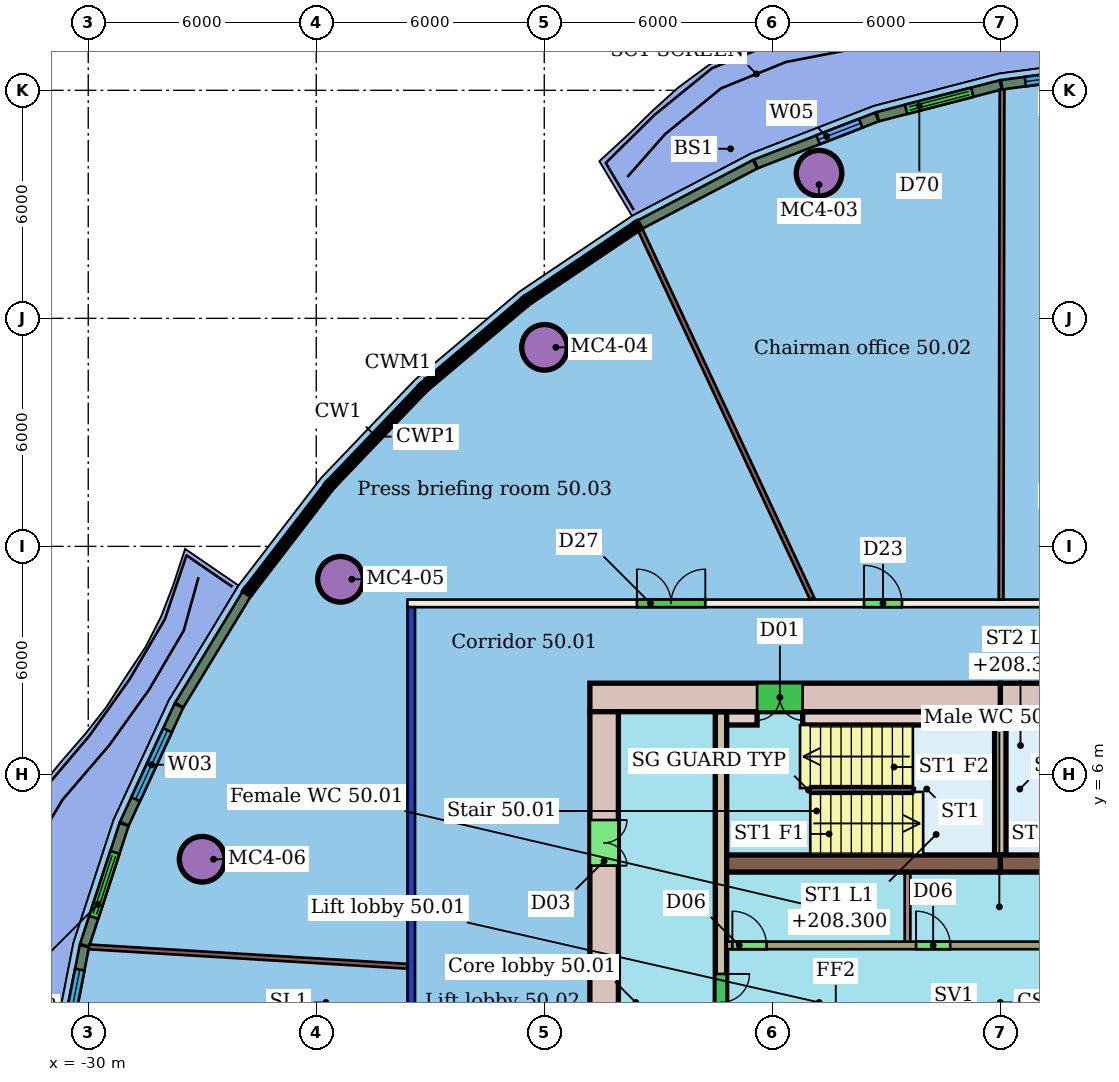
"""IFC4 building model, lengths in metres.
Left out: names, types, materials, properties, quantities, classifications, styles, units other than length and angle.
Written with IfcOpenShell. Run it as: python <this file> out.ifc"""

import sys

from ifc_helpers import new_model, si_unit, direction, frame, frame_2d, origin, origin_2d, place, context, subcontext, project, spatial, rectangle, hollow_circle, extrude, element, fill, save


model = new_model("IFC4")
c1 = context("Model", 3, precision=1e-05, world=origin(), true_north=direction((0.0, 1.0)))
c2 = subcontext(c1, "Body", "Model", "MODEL_VIEW")
j1 = project(units=[si_unit("LENGTHUNIT", "METRE"), si_unit("PLANEANGLEUNIT", "RADIAN")], contexts=[c1])
p1 = place(None, origin())
s1 = spatial("IfcSite", under=j1, at=p1, CompositionType="ELEMENT")
p2 = place(p1, origin())
s2 = spatial("IfcBuilding", under=s1, at=p2, CompositionType="ELEMENT")
p3 = place(p2, frame((0.0, 0.0, 206.5)))
s3 = spatial("IfcBuildingStorey", under=s2, at=p3, CompositionType="ELEMENT", Elevation=206.5)
for number, where, z_axis, x_axis in (
    (1, (-10.769, 21.819, 0.0), (0.0, 0.0, 1.0), (1.0, 0.0, 0.0)),
    (2, (-17.993, 17.237, 0.0), (0.0, 0.0, 1.0), (1.0, 0.0, 0.0)),
    (3, (-23.363, 11.134, 0.0), (0.0, 0.0, 1.0), (1.0, 0.0, 0.0)),
    (4, (-27.003, 3.768, 0.0), (0.0, 0.0, 1.0), (1.0, 0.0, 0.0)),
):
    element("IfcColumn", number, at=place(p3, frame(where, z_axis=z_axis, x_axis=x_axis)), inside=s3, PredefinedType="COLUMN", context=c2, shape_type="SweptSolid", body=[
        extrude(hollow_circle(Radius=0.6, WallThickness=0.045, at=origin_2d()), origin(), (0.0, 0.0, 1.0), 3.45),
    ])
p4 = place(p3, frame((-21.5, -10.4, 0.0), z_axis=(0.0, 0.0, 1.0), x_axis=(0.0, 1.0, 0.0)))
e5 = element("IfcWall", 5, at=p4, inside=s3, PredefinedType="PARTITIONING", context=c2, shape_type="SweptSolid", body=[
    extrude(rectangle(XDim=20.8, YDim=0.2, at=frame_2d((10.4, 0.0))), origin(), (0.0, 0.0, 1.0), 3.05),
])
p5 = place(p4, frame((6.461, 0.0, 0.0)))
e6 = element("IfcOpeningElement", 6, at=p5, cuts=e5, PredefinedType="OPENING", context=c2, shape_type="SweptSolid", body=[
    extrude(rectangle(XDim=1.8, YDim=2.1, at=frame_2d((0.9, 1.05))), frame((0.0, 0.11, 0.0), z_axis=(0.0, -1.0, 0.0), x_axis=(1.0, 0.0, 0.0)), (0.0, 0.0, 1.0), 0.22),
])
p6 = place(p3, frame((-21.6, 10.5, 0.0), z_axis=(0.0, 0.0, 1.0), x_axis=(1.0, 0.0, 0.0)))
e7 = element("IfcWall", 7, at=p6, inside=s3, PredefinedType="PARTITIONING", context=c2, shape_type="SweptSolid", body=[
    extrude(rectangle(XDim=31.2, YDim=0.2, at=frame_2d((15.6, 0.0))), origin(), (0.0, 0.0, 1.0), 3.45),
])
p7 = place(p6, frame((18.717, 0.0, 0.0)))
e8 = element("IfcOpeningElement", 8, at=p7, cuts=e7, PredefinedType="OPENING", context=c2, shape_type="SweptSolid", body=[
    extrude(rectangle(XDim=1.0, YDim=2.4, at=frame_2d((0.5, 1.2))), frame((0.0, 0.11, 0.0), z_axis=(0.0, -1.0, 0.0), x_axis=(1.0, 0.0, 0.0)), (0.0, 0.0, 1.0), 0.22),
])
p8 = place(p6, frame((12.014, 0.0, 0.0)))
e9 = element("IfcOpeningElement", 9, at=p8, cuts=e7, PredefinedType="OPENING", context=c2, shape_type="SweptSolid", body=[
    extrude(rectangle(XDim=1.0, YDim=2.4, at=frame_2d((0.5, 1.2))), frame((0.0, 0.11, 0.0), z_axis=(0.0, -1.0, 0.0), x_axis=(1.0, 0.0, 0.0)), (0.0, 0.0, 1.0), 0.22),
])
p9 = place(p6, frame((6.037, 0.0, 0.0)))
e10 = element("IfcOpeningElement", 10, at=p9, cuts=e7, PredefinedType="OPENING", context=c2, shape_type="SweptSolid", body=[
    extrude(rectangle(XDim=1.8, YDim=2.4, at=frame_2d((0.9, 1.2))), frame((0.0, 0.11, 0.0), z_axis=(0.0, -1.0, 0.0), x_axis=(1.0, 0.0, 0.0)), (0.0, 0.0, 1.0), 0.22),
])
p10 = place(p6, frame((23.88, 0.0, 0.0)))
e11 = element("IfcOpeningElement", 11, at=p10, cuts=e7, PredefinedType="OPENING", context=c2, shape_type="SweptSolid", body=[
    extrude(rectangle(XDim=1.8, YDim=2.1, at=frame_2d((0.9, 1.05))), frame((0.0, 0.11, 0.0), z_axis=(0.0, -1.0, 0.0), x_axis=(1.0, 0.0, 0.0)), (0.0, 0.0, 1.0), 0.22),
])
p11 = place(p3, frame((-5.953, 24.023, 0.0), z_axis=(0.0, 0.0, 1.0), x_axis=(-0.001946158555, -0.999998106232, 0.0)))
e12 = element("IfcWall", 12, at=p11, inside=s3, PredefinedType="PARTITIONING", context=c2, shape_type="SweptSolid", body=[
    extrude(rectangle(XDim=13.423, YDim=0.125, at=frame_2d((6.711, 0.0))), origin(), (0.0, 0.0, 1.0), 3.45),
])
p12 = place(p3, frame((-15.473, 20.33, 0.0), z_axis=(0.0, 0.0, 1.0), x_axis=(0.422368542202, -0.906424191291, 0.0)))
e13 = element("IfcWall", 13, at=p12, inside=s3, PredefinedType="PARTITIONING", context=c2, shape_type="SweptSolid", body=[
    extrude(rectangle(XDim=10.706, YDim=0.125, at=frame_2d((5.353, 0.0))), origin(), (0.0, 0.0, 1.0), 3.45),
])
p13 = place(p3, frame((-29.979, 1.462, 0.0), z_axis=(0.0, 0.0, 1.0), x_axis=(0.998147297747, -0.060843832889, 0.0)))
e14 = element("IfcWall", 14, at=p13, inside=s3, PredefinedType="PARTITIONING", context=c2, shape_type="SweptSolid", body=[
    extrude(rectangle(XDim=8.39, YDim=0.125, at=frame_2d((4.195, 0.0))), origin(), (0.0, 0.0, 1.0), 3.45),
])
p14 = place(p3, frame((-2.731, 24.573, 0.0), z_axis=(0.0, 0.0, 1.0), x_axis=(-0.991444867529, -0.130526145465, 0.0)))
e15 = element("IfcWall", 15, at=p14, inside=s3, PredefinedType="SOLIDWALL", context=c2, shape_type="SweptSolid", body=[
    extrude(rectangle(XDim=3.262, YDim=0.25, at=frame_2d((1.631, 0.0))), origin(), (0.0, 0.0, 1.0), 3.1),
])
p15 = place(p14, frame((0.631, 0.0, 0.9)))
e16 = element("IfcOpeningElement", 16, at=p15, cuts=e15, PredefinedType="OPENING", context=c2, shape_type="SweptSolid", body=[
    extrude(rectangle(XDim=2.0, YDim=2.1, at=frame_2d((1.0, 1.05))), frame((0.0, 0.135, 0.0), z_axis=(0.0, -1.0, 0.0), x_axis=(1.0, 0.0, 0.0)), (0.0, 0.0, 1.0), 0.27),
])
p16 = place(p3, frame((-5.989, 24.143, 0.0), z_axis=(0.0, 0.0, 1.0), x_axis=(-0.968152404137, -0.250361583242, 0.0)))
e17 = element("IfcWall", 17, at=p16, inside=s3, PredefinedType="SOLIDWALL", context=c2, shape_type="SweptSolid", body=[
    extrude(rectangle(XDim=3.344, YDim=0.25, at=frame_2d((1.672, 0.0))), origin(), (0.0, 0.0, 1.0), 3.1),
])
p17 = place(p16, frame((0.772, 0.0, 0.0)))
e18 = element("IfcOpeningElement", 18, at=p17, cuts=e17, PredefinedType="OPENING", context=c2, shape_type="SweptSolid", body=[
    extrude(rectangle(XDim=1.8, YDim=2.4, at=frame_2d((0.9, 1.2))), frame((0.0, 0.135, 0.0), z_axis=(0.0, -1.0, 0.0), x_axis=(1.0, 0.0, 0.0)), (0.0, 0.0, 1.0), 0.27),
])
p18 = place(p3, frame((-9.247, 23.299, 0.0), z_axis=(0.0, 0.0, 1.0), x_axis=(-0.932349015041, -0.361559558236, 0.0)))
e19 = element("IfcWall", 19, at=p18, inside=s3, PredefinedType="SOLIDWALL", context=c2, shape_type="SweptSolid", body=[
    extrude(rectangle(XDim=3.415, YDim=0.25, at=frame_2d((1.708, 0.0))), origin(), (0.0, 0.0, 1.0), 3.1),
])
p19 = place(p18, frame((0.458, 0.0, 0.9)))
e20 = element("IfcOpeningElement", 20, at=p19, cuts=e19, PredefinedType="OPENING", context=c2, shape_type="SweptSolid", body=[
    extrude(rectangle(XDim=1.2, YDim=2.1, at=frame_2d((0.6, 1.05))), frame((0.0, 0.135, 0.0), z_axis=(0.0, -1.0, 0.0), x_axis=(1.0, 0.0, 0.0)), (0.0, 0.0, 1.0), 0.27),
])
p20 = place(p3, frame((-12.452, 22.054, 0.0), z_axis=(0.0, 0.0, 1.0), x_axis=(-0.885763231358, -0.464137369724, 0.0)))
e21 = element("IfcWall", 21, at=p20, inside=s3, PredefinedType="SOLIDWALL", context=c2, shape_type="SweptSolid", body=[
    extrude(rectangle(XDim=3.428, YDim=0.25, at=frame_2d((1.714, 0.0))), origin(), (0.0, 0.0, 1.0), 3.1),
])
p21 = place(p3, frame((-25.827, 10.755, 0.0), z_axis=(0.0, 0.0, 1.0), x_axis=(-0.518887081606, -0.854842790542, 0.0)))
e22 = element("IfcWall", 22, at=p21, inside=s3, PredefinedType="SOLIDWALL", context=c2, shape_type="SweptSolid", body=[
    extrude(rectangle(XDim=3.429, YDim=0.25, at=frame_2d((1.714, 0.0))), origin(), (0.0, 0.0, 1.0), 3.1),
])
p22 = place(p3, frame((-27.616, 7.804, 0.0), z_axis=(0.0, 0.0, 1.0), x_axis=(-0.419438897157, -0.907783570876, 0.0)))
e23 = element("IfcWall", 23, at=p22, inside=s3, PredefinedType="SOLIDWALL", context=c2, shape_type="SweptSolid", body=[
    extrude(rectangle(XDim=3.416, YDim=0.25, at=frame_2d((1.708, 0.0))), origin(), (0.0, 0.0, 1.0), 3.1),
])
p23 = place(p22, frame((0.708, 0.0, 0.9)))
e24 = element("IfcOpeningElement", 24, at=p23, cuts=e23, PredefinedType="OPENING", context=c2, shape_type="SweptSolid", body=[
    extrude(rectangle(XDim=2.0, YDim=2.1, at=frame_2d((1.0, 1.05))), frame((0.0, 0.135, 0.0), z_axis=(0.0, -1.0, 0.0), x_axis=(1.0, 0.0, 0.0)), (0.0, 0.0, 1.0), 0.27),
])
p24 = place(p3, frame((-29.057, 4.683, 0.0), z_axis=(0.0, 0.0, 1.0), x_axis=(-0.310658941467, -0.950521447463, 0.0)))
e25 = element("IfcWall", 25, at=p24, inside=s3, PredefinedType="SOLIDWALL", context=c2, shape_type="SweptSolid", body=[
    extrude(rectangle(XDim=3.344, YDim=0.25, at=frame_2d((1.672, 0.0))), origin(), (0.0, 0.0, 1.0), 3.1),
])
p25 = place(p24, frame((0.772, 0.0, 0.0)))
e26 = element("IfcOpeningElement", 26, at=p25, cuts=e25, PredefinedType="OPENING", context=c2, shape_type="SweptSolid", body=[
    extrude(rectangle(XDim=1.8, YDim=2.4, at=frame_2d((0.9, 1.2))), frame((0.0, 0.135, 0.0), z_axis=(0.0, -1.0, 0.0), x_axis=(1.0, 0.0, 0.0)), (0.0, 0.0, 1.0), 0.27),
])
p26 = place(p3, frame((-30.102, 1.482, 0.0), z_axis=(0.0, 0.0, 1.0), x_axis=(-0.192487942272, -0.981299338673, 0.0)))
e27 = element("IfcWall", 27, at=p26, inside=s3, PredefinedType="SOLIDWALL", context=c2, shape_type="SweptSolid", body=[
    extrude(rectangle(XDim=3.262, YDim=0.25, at=frame_2d((1.631, 0.0))), origin(), (0.0, 0.0, 1.0), 3.1),
])
p27 = place(p26, frame((0.631, 0.0, 0.9)))
e28 = element("IfcOpeningElement", 28, at=p27, cuts=e27, PredefinedType="OPENING", context=c2, shape_type="SweptSolid", body=[
    extrude(rectangle(XDim=2.0, YDim=2.1, at=frame_2d((1.0, 1.05))), frame((0.0, 0.135, 0.0), z_axis=(0.0, -1.0, 0.0), x_axis=(1.0, 0.0, 0.0)), (0.0, 0.0, 1.0), 0.27),
])
p28 = place(p3, frame((4.8, 8.025, 0.0), z_axis=(0.0, 0.0, 1.0), x_axis=(-1.0, 0.0, 0.0)))
e29 = element("IfcWall", 29, at=p28, inside=s3, PredefinedType="SHEAR", context=c2, shape_type="SweptSolid", body=[
    extrude(rectangle(XDim=10.8, YDim=0.75, at=frame_2d((5.4, 0.0))), origin(), (0.0, 0.0, 1.0), 3.3),
])
p29 = place(p28, frame((4.4, 0.0, 0.0)))
e30 = element("IfcOpeningElement", 30, at=p29, cuts=e29, PredefinedType="OPENING", context=c2, shape_type="SweptSolid", body=[
    extrude(rectangle(XDim=1.2, YDim=2.1, at=frame_2d((0.6, 1.05))), frame((0.0, 0.385, 0.0), z_axis=(0.0, -1.0, 0.0), x_axis=(1.0, 0.0, 0.0)), (0.0, 0.0, 1.0), 0.77),
])
p30 = place(p3, frame((-6.0, 8.025, 0.0), z_axis=(0.0, 0.0, 1.0), x_axis=(-1.0, 0.0, 0.0)))
e31 = element("IfcWall", 31, at=p30, inside=s3, PredefinedType="SHEAR", context=c2, shape_type="SweptSolid", body=[
    extrude(rectangle(XDim=10.8, YDim=0.75, at=frame_2d((5.4, 0.0))), origin(), (0.0, 0.0, 1.0), 3.3),
])
p31 = place(p30, frame((5.2, 0.0, 0.0)))
e32 = element("IfcOpeningElement", 32, at=p31, cuts=e31, PredefinedType="OPENING", context=c2, shape_type="SweptSolid", body=[
    extrude(rectangle(XDim=1.2, YDim=2.1, at=frame_2d((0.6, 1.05))), frame((0.0, 0.385, 0.0), z_axis=(0.0, -1.0, 0.0), x_axis=(1.0, 0.0, 0.0)), (0.0, 0.0, 1.0), 0.77),
])
p32 = place(p3, frame((-16.425, 7.65, 0.0), z_axis=(0.0, 0.0, 1.0), x_axis=(0.0, -1.0, 0.0)))
e33 = element("IfcWall", 33, at=p32, inside=s3, PredefinedType="SHEAR", context=c2, shape_type="SweptSolid", body=[
    extrude(rectangle(XDim=15.3, YDim=0.75, at=frame_2d((7.65, 0.0))), origin(), (0.0, 0.0, 1.0), 3.3),
])
p33 = place(p32, frame((11.25, 0.0, 0.0)))
e34 = element("IfcOpeningElement", 34, at=p33, cuts=e33, PredefinedType="OPENING", context=c2, shape_type="SweptSolid", body=[
    extrude(rectangle(XDim=1.2, YDim=2.1, at=frame_2d((0.6, 1.05))), frame((0.0, 0.385, 0.0), z_axis=(0.0, -1.0, 0.0), x_axis=(1.0, 0.0, 0.0)), (0.0, 0.0, 1.0), 0.77),
])
p34 = place(p32, frame((2.85, 0.0, 0.0)))
e35 = element("IfcOpeningElement", 35, at=p34, cuts=e33, PredefinedType="OPENING", context=c2, shape_type="SweptSolid", body=[
    extrude(rectangle(XDim=1.2, YDim=2.1, at=frame_2d((0.6, 1.05))), frame((0.0, 0.385, 0.0), z_axis=(0.0, -1.0, 0.0), x_axis=(1.0, 0.0, 0.0)), (0.0, 0.0, 1.0), 0.77),
])
for number, where, z_axis, x_axis in (
    (36, (-13.2, 3.655, 0.0), (0.0, 0.0, 1.0), (1.0, 0.0, 0.0)),
    (37, (-6.0, 3.655, 0.0), (0.0, 0.0, 1.0), (1.0, 0.0, 0.0)),
):
    element("IfcWall", number, at=place(p3, frame(where, z_axis=z_axis, x_axis=x_axis)), inside=s3, PredefinedType="SHEAR", context=c2, shape_type="SweptSolid", body=[
        extrude(rectangle(XDim=7.2, YDim=0.45, at=frame_2d((3.6, 0.0))), origin(), (0.0, 0.0, 1.0), 3.3),
    ])
p35 = place(p3, frame((-13.35, 7.65, 0.0), z_axis=(0.0, 0.0, 1.0), x_axis=(0.0, -1.0, 0.0)))
e38 = element("IfcWall", 38, at=p35, inside=s3, PredefinedType="SHEAR", context=c2, shape_type="SweptSolid", body=[
    extrude(rectangle(XDim=15.3, YDim=0.3, at=frame_2d((7.65, 0.0))), origin(), (0.0, 0.0, 1.0), 3.3),
])
p36 = place(p35, frame((6.9, 0.0, 0.0)))
e39 = element("IfcOpeningElement", 39, at=p36, cuts=e38, PredefinedType="OPENING", context=c2, shape_type="SweptSolid", body=[
    extrude(rectangle(XDim=1.5, YDim=2.1, at=frame_2d((0.75, 1.05))), frame((0.0, 0.16, 0.0), z_axis=(0.0, -1.0, 0.0), x_axis=(1.0, 0.0, 0.0)), (0.0, 0.0, 1.0), 0.32),
])
p37 = place(p3, frame((-13.2, 1.5, 0.0), z_axis=(0.0, 0.0, 1.0), x_axis=(1.0, 0.0, 0.0)))
e40 = element("IfcWall", 40, at=p37, inside=s3, PredefinedType="SHEAR", context=c2, shape_type="SweptSolid", body=[
    extrude(rectangle(XDim=14.4, YDim=0.2, at=frame_2d((7.2, 0.0))), origin(), (0.0, 0.0, 1.0), 3.3),
])
p38 = place(p37, frame((10.312, 0.0, 0.0)))
e41 = element("IfcOpeningElement", 41, at=p38, cuts=e40, PredefinedType="OPENING", context=c2, shape_type="SweptSolid", body=[
    extrude(rectangle(XDim=1.1, YDim=2.1, at=frame_2d((0.55, 1.05))), frame((0.0, 0.11, 0.0), z_axis=(0.0, -1.0, 0.0), x_axis=(1.0, 0.0, 0.0)), (0.0, 0.0, 1.0), 0.22),
])
p39 = place(p37, frame((12.754, 0.0, 0.0)))
e42 = element("IfcOpeningElement", 42, at=p39, cuts=e40, PredefinedType="OPENING", context=c2, shape_type="SweptSolid", body=[
    extrude(rectangle(XDim=1.1, YDim=2.1, at=frame_2d((0.55, 1.05))), frame((0.0, 0.11, 0.0), z_axis=(0.0, -1.0, 0.0), x_axis=(1.0, 0.0, 0.0)), (0.0, 0.0, 1.0), 0.22),
])
p40 = place(p37, frame((0.15, 0.0, 0.0)))
e43 = element("IfcOpeningElement", 43, at=p40, cuts=e40, PredefinedType="OPENING", context=c2, shape_type="SweptSolid", body=[
    extrude(rectangle(XDim=0.9, YDim=2.1, at=frame_2d((0.45, 1.05))), frame((0.0, 0.11, 0.0), z_axis=(0.0, -1.0, 0.0), x_axis=(1.0, 0.0, 0.0)), (0.0, 0.0, 1.0), 0.22),
])
p41 = place(p37, frame((4.983, 0.0, 0.0)))
e44 = element("IfcOpeningElement", 44, at=p41, cuts=e40, PredefinedType="OPENING", context=c2, shape_type="SweptSolid", body=[
    extrude(rectangle(XDim=0.9, YDim=2.1, at=frame_2d((0.45, 1.05))), frame((0.0, 0.11, 0.0), z_axis=(0.0, -1.0, 0.0), x_axis=(1.0, 0.0, 0.0)), (0.0, 0.0, 1.0), 0.22),
])
p42 = place(p3, frame((-6.0, 3.88, 0.0), z_axis=(0.0, 0.0, 1.0), x_axis=(0.0, 1.0, 0.0)))
e45 = element("IfcWall", 45, at=p42, inside=s3, PredefinedType="SHEAR", context=c2, shape_type="SweptSolid", body=[
    extrude(rectangle(XDim=3.77, YDim=0.3, at=frame_2d((1.885, 0.0))), origin(), (0.0, 0.0, 1.0), 3.3),
])
p43 = place(p3, frame((-13.2, 7.475, 0.0), z_axis=(0.0, 0.0, 1.0), x_axis=(1.0, 0.0, 0.0)))
e46 = element("IfcWall", 46, at=p43, inside=s3, PredefinedType="SHEAR", context=c2, shape_type="SweptSolid", body=[
    extrude(rectangle(XDim=0.8, YDim=0.35, at=frame_2d((0.4, 0.0))), origin(), (0.0, 0.0, 1.0), 3.3),
])
for number, where, z_axis, x_axis in (
    (47, (-11.2, 7.475, 0.0), (0.0, 0.0, 1.0), (1.0, 0.0, 0.0)),
    (48, (-5.85, 7.475, 0.0), (0.0, 0.0, 1.0), (1.0, 0.0, 0.0)),
):
    element("IfcWall", number, at=place(p3, frame(where, z_axis=z_axis, x_axis=x_axis)), inside=s3, PredefinedType="SHEAR", context=c2, shape_type="SweptSolid", body=[
        extrude(rectangle(XDim=5.05, YDim=0.35, at=frame_2d((2.525, 0.0))), origin(), (0.0, 0.0, 1.0), 3.3),
    ])
p44 = place(p3, frame((-8.442, 1.6, 0.0), z_axis=(0.0, 0.0, 1.0), x_axis=(0.0, 1.0, 0.0)))
e49 = element("IfcWall", 49, at=p44, inside=s3, PredefinedType="PARTITIONING", context=c2, shape_type="SweptSolid", body=[
    extrude(rectangle(XDim=1.83, YDim=0.15, at=frame_2d((0.915, 0.0))), origin(), (0.0, 0.0, 1.0), 3.3),
])
p45 = place(p8, origin())
e50 = element("IfcDoor", 50, at=p45, inside=s3, OperationType="SINGLE_SWING_LEFT", PredefinedType="DOOR", context=c2, shape_type="SweptSolid", body=[
    extrude(rectangle(XDim=1.0, YDim=2.4, at=frame_2d((0.5, 1.2))), frame((0.0, 0.025, 0.0), z_axis=(0.0, -1.0, 0.0), x_axis=(1.0, 0.0, 0.0)), (0.0, 0.0, 1.0), 0.05),
])
fill(e9, e50)
p46 = place(p9, origin())
e51 = element("IfcDoor", 51, at=p46, inside=s3, OperationType="DOUBLE_DOOR_SINGLE_SWING", PredefinedType="DOOR", context=c2, shape_type="SweptSolid", body=[
    extrude(rectangle(XDim=1.8, YDim=2.4, at=frame_2d((0.9, 1.2))), frame((0.0, 0.025, 0.0), z_axis=(0.0, -1.0, 0.0), x_axis=(1.0, 0.0, 0.0)), (0.0, 0.0, 1.0), 0.05),
])
fill(e10, e51)
p47 = place(p15, origin())
e52 = element("IfcWindow", 52, at=p47, inside=s3, PartitioningType="SINGLE_PANEL", PredefinedType="WINDOW", context=c2, shape_type="SweptSolid", body=[
    extrude(rectangle(XDim=2.0, YDim=2.1, at=frame_2d((1.0, 1.05))), frame((0.0, 0.03, 0.0), z_axis=(0.0, -1.0, 0.0), x_axis=(1.0, 0.0, 0.0)), (0.0, 0.0, 1.0), 0.06),
])
fill(e16, e52)
p48 = place(p17, origin())
e53 = element("IfcDoor", 53, at=p48, inside=s3, OperationType="DOUBLE_DOOR_SLIDING", PredefinedType="DOOR", context=c2, shape_type="SweptSolid", body=[
    extrude(rectangle(XDim=1.8, YDim=2.4, at=frame_2d((0.9, 1.2))), frame((0.0, 0.025, 0.0), z_axis=(0.0, -1.0, 0.0), x_axis=(1.0, 0.0, 0.0)), (0.0, 0.0, 1.0), 0.05),
])
fill(e18, e53)
p49 = place(p19, origin())
e54 = element("IfcWindow", 54, at=p49, inside=s3, PartitioningType="SINGLE_PANEL", PredefinedType="WINDOW", context=c2, shape_type="SweptSolid", body=[
    extrude(rectangle(XDim=1.2, YDim=2.1, at=frame_2d((0.6, 1.05))), frame((0.0, 0.03, 0.0), z_axis=(0.0, -1.0, 0.0), x_axis=(1.0, 0.0, 0.0)), (0.0, 0.0, 1.0), 0.06),
])
fill(e20, e54)
p50 = place(p23, origin())
e55 = element("IfcWindow", 55, at=p50, inside=s3, PartitioningType="SINGLE_PANEL", PredefinedType="WINDOW", context=c2, shape_type="SweptSolid", body=[
    extrude(rectangle(XDim=2.0, YDim=2.1, at=frame_2d((1.0, 1.05))), frame((0.0, 0.03, 0.0), z_axis=(0.0, -1.0, 0.0), x_axis=(1.0, 0.0, 0.0)), (0.0, 0.0, 1.0), 0.06),
])
fill(e24, e55)
p51 = place(p25, origin())
e56 = element("IfcDoor", 56, at=p51, inside=s3, OperationType="DOUBLE_DOOR_SLIDING", PredefinedType="DOOR", context=c2, shape_type="SweptSolid", body=[
    extrude(rectangle(XDim=1.8, YDim=2.4, at=frame_2d((0.9, 1.2))), frame((0.0, 0.025, 0.0), z_axis=(0.0, -1.0, 0.0), x_axis=(1.0, 0.0, 0.0)), (0.0, 0.0, 1.0), 0.05),
])
fill(e26, e56)
p52 = place(p27, origin())
e57 = element("IfcWindow", 57, at=p52, inside=s3, PartitioningType="SINGLE_PANEL", PredefinedType="WINDOW", context=c2, shape_type="SweptSolid", body=[
    extrude(rectangle(XDim=2.0, YDim=2.1, at=frame_2d((1.0, 1.05))), frame((0.0, 0.03, 0.0), z_axis=(0.0, -1.0, 0.0), x_axis=(1.0, 0.0, 0.0)), (0.0, 0.0, 1.0), 0.06),
])
fill(e28, e57)
p53 = place(p31, origin())
e58 = element("IfcDoor", 58, at=p53, inside=s3, OperationType="DOUBLE_DOOR_SINGLE_SWING", PredefinedType="NOTDEFINED", context=c2, shape_type="SweptSolid", body=[
    extrude(rectangle(XDim=1.2, YDim=2.1, at=frame_2d((0.6, 1.05))), frame((0.0, 0.025, 0.0), z_axis=(0.0, -1.0, 0.0), x_axis=(1.0, 0.0, 0.0)), (0.0, 0.0, 1.0), 0.05),
])
fill(e32, e58)
p54 = place(p34, origin())
e59 = element("IfcDoor", 59, at=p54, inside=s3, OperationType="DOUBLE_DOOR_SINGLE_SWING", PredefinedType="NOTDEFINED", context=c2, shape_type="SweptSolid", body=[
    extrude(rectangle(XDim=1.2, YDim=2.1, at=frame_2d((0.6, 1.05))), frame((0.0, 0.025, 0.0), z_axis=(0.0, -1.0, 0.0), x_axis=(1.0, 0.0, 0.0)), (0.0, 0.0, 1.0), 0.05),
])
fill(e35, e59)
p55 = place(p36, origin())
e60 = element("IfcDoor", 60, at=p55, inside=s3, OperationType="DOUBLE_DOOR_SINGLE_SWING", PredefinedType="NOTDEFINED", context=c2, shape_type="SweptSolid", body=[
    extrude(rectangle(XDim=1.5, YDim=2.1, at=frame_2d((0.75, 1.05))), frame((0.0, 0.025, 0.0), z_axis=(0.0, -1.0, 0.0), x_axis=(1.0, 0.0, 0.0)), (0.0, 0.0, 1.0), 0.05),
])
fill(e39, e60)
p56 = place(p40, origin())
e61 = element("IfcDoor", 61, at=p56, inside=s3, OperationType="SINGLE_SWING_LEFT", PredefinedType="NOTDEFINED", context=c2, shape_type="SweptSolid", body=[
    extrude(rectangle(XDim=0.9, YDim=2.1, at=frame_2d((0.45, 1.05))), frame((0.0, 0.025, 0.0), z_axis=(0.0, -1.0, 0.0), x_axis=(1.0, 0.0, 0.0)), (0.0, 0.0, 1.0), 0.05),
])
fill(e43, e61)
p57 = place(p41, origin())
e62 = element("IfcDoor", 62, at=p57, inside=s3, OperationType="SINGLE_SWING_LEFT", PredefinedType="NOTDEFINED", context=c2, shape_type="SweptSolid", body=[
    extrude(rectangle(XDim=0.9, YDim=2.1, at=frame_2d((0.45, 1.05))), frame((0.0, 0.025, 0.0), z_axis=(0.0, -1.0, 0.0), x_axis=(1.0, 0.0, 0.0)), (0.0, 0.0, 1.0), 0.05),
])
fill(e44, e62)
save(model, sys.argv[1])
